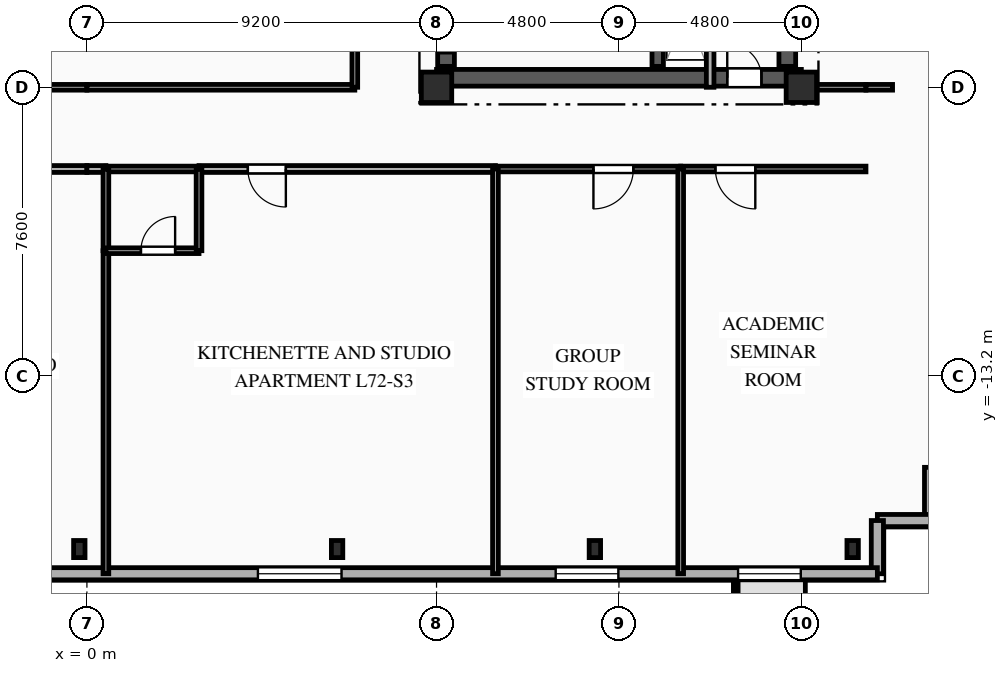
"""IFC4 building model, lengths in metres.
Left out: names, types, materials, properties, quantities, classifications, styles, units other than length and angle.
Written with IfcOpenShell. Run it as: python <this file> out.ifc"""

import sys

from ifc_helpers import new_model, si_unit, direction, frame, frame_2d, origin, origin_2d, place, context, subcontext, project, spatial, rectangle, i_section, extrude, element, fill, save


model = new_model("IFC4")
c1 = context("Model", 3, precision=1e-05, world=origin(), true_north=direction((0.0, 1.0)))
c2 = subcontext(c1, "Body", "Model", "MODEL_VIEW")
j1 = project(units=[si_unit("LENGTHUNIT", "METRE"), si_unit("PLANEANGLEUNIT", "RADIAN")], contexts=[c1])
p1 = place(None, origin())
s1 = spatial("IfcSite", under=j1, at=p1, CompositionType="ELEMENT")
p2 = place(p1, origin())
s2 = spatial("IfcBuilding", under=s1, at=p2, CompositionType="ELEMENT")
p3 = place(p2, frame((0.0, 0.0, 255.1)))
s3 = spatial("IfcBuildingStorey", under=s2, at=p3, CompositionType="ELEMENT", Elevation=255.1)
for number, where, z_axis, x_axis in (
    (1, (9.2, -5.6, 0.0), (0.0, 0.0, 1.0), (1.0, 0.0, 0.0)),
    (2, (18.8, -5.6, 0.0), (0.0, 0.0, 1.0), (1.0, 0.0, 0.0)),
):
    element("IfcColumn", number, at=place(p3, frame(where, z_axis=z_axis, x_axis=x_axis)), inside=s3, PredefinedType="COLUMN", context=c2, shape_type="SweptSolid", body=[
        extrude(rectangle(XDim=0.8, YDim=0.8, at=origin_2d()), origin(), (0.0, 0.0, 1.0), 3.35),
    ])
for number, where, z_axis, x_axis in (
    (3, (-0.2, -17.75, 0.0), (0.0, 0.0, 1.0), (1.0, 0.0, 0.0)),
    (4, (6.583, -17.75, 0.0), (0.0, 0.0, 1.0), (1.0, 0.0, 0.0)),
    (5, (13.367, -17.75, 0.0), (0.0, 0.0, 1.0), (1.0, 0.0, 0.0)),
    (6, (20.15, -17.75, 0.0), (0.0, 0.0, 1.0), (1.0, 0.0, 0.0)),
):
    element("IfcColumn", number, at=place(p3, frame(where, z_axis=z_axis, x_axis=x_axis)), inside=s3, PredefinedType="COLUMN", context=c2, shape_type="SweptSolid", body=[
        extrude(i_section(OverallWidth=0.3, OverallDepth=0.45, WebThickness=0.014, FlangeThickness=0.026, FilletRadius=0.027, at=origin_2d()), origin(), (0.0, 0.0, 1.0), 3.35),
    ])
for number, where, z_axis, x_axis in (
    (7, (22.2, -15.6, 0.0), (0.0, 0.0, 1.0), (0.0, -1.0, 0.0)),
    (8, (22.2, -17.0, 0.0), (0.0, 0.0, 1.0), (-1.0, 0.0, 0.0)),
    (9, (20.8, -17.0, 0.0), (0.0, 0.0, 1.0), (0.0, -1.0, 0.0)),
):
    element("IfcWall", number, at=place(p3, frame(where, z_axis=z_axis, x_axis=x_axis)), inside=s3, PredefinedType="SOLIDWALL", context=c2, shape_type="SweptSolid", body=[
        extrude(rectangle(XDim=1.4, YDim=0.32, at=frame_2d((0.7, 0.0))), origin(), (0.0, 0.0, 1.0), 3.04),
    ])
p4 = place(p3, frame((20.8, -18.4, 0.0), z_axis=(0.0, 0.0, 1.0), x_axis=(-1.0, 0.0, 0.0)))
e10 = element("IfcWall", 10, at=p4, inside=s3, PredefinedType="SOLIDWALL", context=c2, shape_type="SweptSolid", body=[
    extrude(rectangle(XDim=42.0, YDim=0.32, at=frame_2d((21.0, 0.0))), origin(), (0.0, 0.0, 1.0), 3.04),
])
p5 = place(p4, frame((2.015, 0.0, 0.85)))
e11 = element("IfcOpeningElement", 11, at=p5, cuts=e10, PredefinedType="OPENING", context=c2, shape_type="SweptSolid", body=[
    extrude(rectangle(XDim=1.65, YDim=1.85, at=frame_2d((0.825, 0.925))), frame((0.0, 0.17, 0.0), z_axis=(0.0, -1.0, 0.0), x_axis=(1.0, 0.0, 0.0)), (0.0, 0.0, 1.0), 0.34),
])
p6 = place(p4, frame((6.815, 0.0, 0.85)))
e12 = element("IfcOpeningElement", 12, at=p6, cuts=e10, PredefinedType="OPENING", context=c2, shape_type="SweptSolid", body=[
    extrude(rectangle(XDim=1.65, YDim=1.85, at=frame_2d((0.825, 0.925))), frame((0.0, 0.17, 0.0), z_axis=(0.0, -1.0, 0.0), x_axis=(1.0, 0.0, 0.0)), (0.0, 0.0, 1.0), 0.34),
])
p7 = place(p4, frame((14.1, 0.0, 0.85)))
e13 = element("IfcOpeningElement", 13, at=p7, cuts=e10, PredefinedType="OPENING", context=c2, shape_type="SweptSolid", body=[
    extrude(rectangle(XDim=2.2, YDim=1.85, at=frame_2d((1.1, 0.925))), frame((0.0, 0.17, 0.0), z_axis=(0.0, -1.0, 0.0), x_axis=(1.0, 0.0, 0.0)), (0.0, 0.0, 1.0), 0.34),
])
p8 = place(p4, frame((24.34, 0.0, 0.85)))
e14 = element("IfcOpeningElement", 14, at=p8, cuts=e10, PredefinedType="OPENING", context=c2, shape_type="SweptSolid", body=[
    extrude(rectangle(XDim=2.2, YDim=1.85, at=frame_2d((1.1, 0.925))), frame((0.0, 0.17, 0.0), z_axis=(0.0, -1.0, 0.0), x_axis=(1.0, 0.0, 0.0)), (0.0, 0.0, 1.0), 0.34),
])
p9 = place(p4, frame((32.455, 0.0, 0.85)))
e15 = element("IfcOpeningElement", 15, at=p9, cuts=e10, PredefinedType="OPENING", context=c2, shape_type="SweptSolid", body=[
    extrude(rectangle(XDim=1.65, YDim=1.85, at=frame_2d((0.825, 0.925))), frame((0.0, 0.17, 0.0), z_axis=(0.0, -1.0, 0.0), x_axis=(1.0, 0.0, 0.0)), (0.0, 0.0, 1.0), 0.34),
])
p10 = place(p4, frame((37.855, 0.0, 0.85)))
e16 = element("IfcOpeningElement", 16, at=p10, cuts=e10, PredefinedType="OPENING", context=c2, shape_type="SweptSolid", body=[
    extrude(rectangle(XDim=1.65, YDim=1.85, at=frame_2d((0.825, 0.925))), frame((0.0, 0.17, 0.0), z_axis=(0.0, -1.0, 0.0), x_axis=(1.0, 0.0, 0.0)), (0.0, 0.0, 1.0), 0.34),
])
p11 = place(p3, frame((9.2, -5.35, 0.0), z_axis=(0.0, 0.0, 1.0), x_axis=(1.0, 0.0, 0.0)))
e17 = element("IfcWall", 17, at=p11, inside=s3, PredefinedType="SHEAR", context=c2, shape_type="SweptSolid", body=[
    extrude(rectangle(XDim=9.6, YDim=0.44, at=frame_2d((4.8, 0.0))), origin(), (0.0, 0.0, 1.0), 3.04),
])
p12 = place(p11, frame((7.65, 0.0, 0.0)))
e18 = element("IfcOpeningElement", 18, at=p12, cuts=e17, PredefinedType="OPENING", context=c2, shape_type="SweptSolid", body=[
    extrude(rectangle(XDim=0.9, YDim=2.1, at=frame_2d((0.45, 1.05))), frame((0.0, 0.23, 0.0), z_axis=(0.0, -1.0, 0.0), x_axis=(1.0, 0.0, 0.0)), (0.0, 0.0, 1.0), 0.46),
])
p13 = place(p3, frame((9.45, -5.05, 0.0), z_axis=(0.0, 0.0, 1.0), x_axis=(0.0, 1.0, 0.0)))
e19 = element("IfcWall", 19, at=p13, inside=s3, PredefinedType="SHEAR", context=c2, shape_type="SweptSolid", body=[
    extrude(rectangle(XDim=10.1, YDim=0.44, at=frame_2d((5.05, 0.0))), origin(), (0.0, 0.0, 1.0), 3.04),
])
p14 = place(p13, frame((7.15, 0.0, 0.0)))
e20 = element("IfcOpeningElement", 20, at=p14, cuts=e19, PredefinedType="OPENING", context=c2, shape_type="SweptSolid", body=[
    extrude(rectangle(XDim=0.9, YDim=2.1, at=frame_2d((0.45, 1.05))), frame((0.0, 0.23, 0.0), z_axis=(0.0, -1.0, 0.0), x_axis=(1.0, 0.0, 0.0)), (0.0, 0.0, 1.0), 0.46),
])
p15 = place(p13, frame((2.4, 0.0, 0.0)))
e21 = element("IfcOpeningElement", 21, at=p15, cuts=e19, PredefinedType="OPENING", context=c2, shape_type="SweptSolid", body=[
    extrude(rectangle(XDim=1.2, YDim=2.15, at=frame_2d((0.6, 1.075))), frame((0.0, 0.23, 0.0), z_axis=(0.0, -1.0, 0.0), x_axis=(1.0, 0.0, 0.0)), (0.0, 0.0, 1.0), 0.46),
])
p16 = place(p13, frame((0.35, 0.0, 0.0)))
e22 = element("IfcOpeningElement", 22, at=p16, cuts=e19, PredefinedType="OPENING", context=c2, shape_type="SweptSolid", body=[
    extrude(rectangle(XDim=0.9, YDim=2.1, at=frame_2d((0.45, 1.05))), frame((0.0, 0.23, 0.0), z_axis=(0.0, -1.0, 0.0), x_axis=(1.0, 0.0, 0.0)), (0.0, 0.0, 1.0), 0.46),
])
p17 = place(p3, frame((18.43, -5.05, 0.0), z_axis=(0.0, 0.0, 1.0), x_axis=(0.0, 1.0, 0.0)))
e23 = element("IfcWall", 23, at=p17, inside=s3, PredefinedType="SHEAR", context=c2, shape_type="SweptSolid", body=[
    extrude(rectangle(XDim=10.1, YDim=0.44, at=frame_2d((5.05, 0.0))), origin(), (0.0, 0.0, 1.0), 3.04),
])
p18 = place(p3, frame((15.02, -5.05, 0.0), z_axis=(0.0, 0.0, 1.0), x_axis=(0.0, 1.0, 0.0)))
e24 = element("IfcWall", 24, at=p18, inside=s3, PredefinedType="SHEAR", context=c2, shape_type="SweptSolid", body=[
    extrude(rectangle(XDim=10.1, YDim=0.3, at=frame_2d((5.05, 0.0))), origin(), (0.0, 0.0, 1.0), 3.04),
])
p19 = place(p3, frame((16.4, -2.11, 0.0), z_axis=(0.0, 0.0, 1.0), x_axis=(0.0, -1.0, 0.0)))
e25 = element("IfcWall", 25, at=p19, inside=s3, PredefinedType="PARTITIONING", context=c2, shape_type="SweptSolid", body=[
    extrude(rectangle(XDim=3.49, YDim=0.2, at=frame_2d((1.745, 0.0))), origin(), (0.0, 0.0, 1.0), 3.04),
])
p20 = place(p3, frame((0.0, -7.75, 0.0), z_axis=(0.0, 0.0, 1.0), x_axis=(-1.0, 0.0, 0.0)))
e26 = element("IfcWall", 26, at=p20, inside=s3, PredefinedType="PARTITIONING", context=c2, shape_type="SweptSolid", body=[
    extrude(rectangle(XDim=7.3, YDim=0.18, at=frame_2d((3.65, 0.0))), origin(), (0.0, 0.0, 1.0), 3.04),
])
p21 = place(p20, frame((1.222, 0.0, 0.0)))
e27 = element("IfcOpeningElement", 27, at=p21, cuts=e26, PredefinedType="OPENING", context=c2, shape_type="SweptSolid", body=[
    extrude(rectangle(XDim=1.0, YDim=2.15, at=frame_2d((0.5, 1.075))), frame((0.0, 0.1, 0.0), z_axis=(0.0, -1.0, 0.0), x_axis=(1.0, 0.0, 0.0)), (0.0, 0.0, 1.0), 0.2),
])
p22 = place(p3, frame((-7.05, -5.6, 0.0), z_axis=(0.0, 0.0, 1.0), x_axis=(1.0, 0.0, 0.0)))
e28 = element("IfcWall", 28, at=p22, inside=s3, PredefinedType="PARTITIONING", context=c2, shape_type="SweptSolid", body=[
    extrude(rectangle(XDim=7.05, YDim=0.15, at=frame_2d((3.525, 0.0))), origin(), (0.0, 0.0, 1.0), 2.525),
])
p23 = place(p22, frame((4.815, 0.0, 0.0)))
e29 = element("IfcOpeningElement", 29, at=p23, cuts=e28, PredefinedType="OPENING", context=c2, shape_type="SweptSolid", body=[
    extrude(rectangle(XDim=1.05, YDim=2.15, at=frame_2d((0.525, 1.075))), frame((0.0, 0.085, 0.0), z_axis=(0.0, -1.0, 0.0), x_axis=(1.0, 0.0, 0.0)), (0.0, 0.0, 1.0), 0.17),
])
p24 = place(p3, frame((18.8, -5.6, 0.0), z_axis=(0.0, 0.0, 1.0), x_axis=(1.0, 0.0, 0.0)))
e30 = element("IfcWall", 30, at=p24, inside=s3, PredefinedType="PARTITIONING", context=c2, shape_type="SweptSolid", body=[
    extrude(rectangle(XDim=1.7, YDim=0.15, at=frame_2d((0.85, 0.0))), origin(), (0.0, 0.0, 1.0), 3.04),
])
p25 = place(p3, frame((20.5, -5.6, 0.0), z_axis=(0.0, 0.0, 1.0), x_axis=(1.0, 0.0, 0.0)))
e31 = element("IfcWall", 31, at=p25, inside=s3, PredefinedType="PARTITIONING", context=c2, shape_type="SweptSolid", body=[
    extrude(rectangle(XDim=0.7, YDim=0.15, at=frame_2d((0.35, 0.0))), origin(), (0.0, 0.0, 1.0), 3.04),
])
p26 = place(p3, frame((0.5, -7.75, 0.0), z_axis=(0.0, 0.0, 1.0), x_axis=(-1.0, 0.0, 0.0)))
e32 = element("IfcWall", 32, at=p26, inside=s3, PredefinedType="PARTITIONING", context=c2, shape_type="SweptSolid", body=[
    extrude(rectangle(XDim=0.5, YDim=0.18, at=frame_2d((0.25, 0.0))), origin(), (0.0, 0.0, 1.0), 3.04),
])
p27 = place(p3, frame((10.75, -7.75, 0.0), z_axis=(0.0, 0.0, 1.0), x_axis=(-1.0, 0.0, 0.0)))
e33 = element("IfcWall", 33, at=p27, inside=s3, PredefinedType="PARTITIONING", context=c2, shape_type="SweptSolid", body=[
    extrude(rectangle(XDim=7.8, YDim=0.18, at=frame_2d((3.9, 0.0))), origin(), (0.0, 0.0, 1.0), 3.04),
])
p28 = place(p27, frame((5.515, 0.0, 0.0)))
e34 = element("IfcOpeningElement", 34, at=p28, cuts=e33, PredefinedType="OPENING", context=c2, shape_type="SweptSolid", body=[
    extrude(rectangle(XDim=1.0, YDim=2.15, at=frame_2d((0.5, 1.075))), frame((0.0, 0.1, 0.0), z_axis=(0.0, -1.0, 0.0), x_axis=(1.0, 0.0, 0.0)), (0.0, 0.0, 1.0), 0.2),
])
p29 = place(p3, frame((2.95, -7.75, 0.0), z_axis=(0.0, 0.0, 1.0), x_axis=(-1.0, 0.0, 0.0)))
e35 = element("IfcWall", 35, at=p29, inside=s3, PredefinedType="PLUMBINGWALL", context=c2, shape_type="SweptSolid", body=[
    extrude(rectangle(XDim=2.45, YDim=0.15, at=frame_2d((1.225, 0.0))), origin(), (0.0, 0.0, 1.0), 3.04),
])
p30 = place(p3, frame((15.625, -7.75, 0.0), z_axis=(0.0, 0.0, 1.0), x_axis=(-1.0, 0.0, 0.0)))
e36 = element("IfcWall", 36, at=p30, inside=s3, PredefinedType="PARTITIONING", context=c2, shape_type="SweptSolid", body=[
    extrude(rectangle(XDim=4.875, YDim=0.15, at=frame_2d((2.438, 0.0))), origin(), (0.0, 0.0, 1.0), 3.04),
])
p31 = place(p30, frame((1.246, 0.0, 0.0)))
e37 = element("IfcOpeningElement", 37, at=p31, cuts=e36, PredefinedType="OPENING", context=c2, shape_type="SweptSolid", body=[
    extrude(rectangle(XDim=1.05, YDim=2.15, at=frame_2d((0.525, 1.075))), frame((0.0, 0.085, 0.0), z_axis=(0.0, -1.0, 0.0), x_axis=(1.0, 0.0, 0.0)), (0.0, 0.0, 1.0), 0.17),
])
p32 = place(p3, frame((20.5, -7.75, 0.0), z_axis=(0.0, 0.0, 1.0), x_axis=(-1.0, 0.0, 0.0)))
e38 = element("IfcWall", 38, at=p32, inside=s3, PredefinedType="PARTITIONING", context=c2, shape_type="SweptSolid", body=[
    extrude(rectangle(XDim=4.875, YDim=0.15, at=frame_2d((2.438, 0.0))), origin(), (0.0, 0.0, 1.0), 3.04),
])
p33 = place(p32, frame((2.912, 0.0, 0.0)))
e39 = element("IfcOpeningElement", 39, at=p33, cuts=e38, PredefinedType="OPENING", context=c2, shape_type="SweptSolid", body=[
    extrude(rectangle(XDim=1.05, YDim=2.15, at=frame_2d((0.525, 1.075))), frame((0.0, 0.085, 0.0), z_axis=(0.0, -1.0, 0.0), x_axis=(1.0, 0.0, 0.0)), (0.0, 0.0, 1.0), 0.17),
])
p34 = place(p3, frame((0.0, -5.6, 0.0), z_axis=(0.0, 0.0, 1.0), x_axis=(1.0, 0.0, 0.0)))
e40 = element("IfcWall", 40, at=p34, inside=s3, PredefinedType="PARTITIONING", context=c2, shape_type="SweptSolid", body=[
    extrude(rectangle(XDim=7.05, YDim=0.15, at=frame_2d((3.525, 0.0))), origin(), (0.0, 0.0, 1.0), 2.525),
])
p35 = place(p3, frame((7.05, -5.6, 0.0), z_axis=(0.0, 0.0, 1.0), x_axis=(0.0, 1.0, 0.0)))
e41 = element("IfcWall", 41, at=p35, inside=s3, PredefinedType="PARTITIONING", context=c2, shape_type="SweptSolid", body=[
    extrude(rectangle(XDim=7.05, YDim=0.15, at=frame_2d((3.525, 0.0))), origin(), (0.0, 0.0, 1.0), 3.04),
])
p36 = place(p3, frame((0.5, -9.9, 0.0), z_axis=(0.0, 0.0, 1.0), x_axis=(0.0, -1.0, 0.0)))
e42 = element("IfcWall", 42, at=p36, inside=s3, PredefinedType="PARTITIONING", context=c2, shape_type="SweptSolid", body=[
    extrude(rectangle(XDim=8.5, YDim=0.15, at=frame_2d((4.25, 0.0))), origin(), (0.0, 0.0, 1.0), 3.04),
])
p37 = place(p3, frame((0.5, -7.75, 0.0), z_axis=(0.0, 0.0, 1.0), x_axis=(0.0, -1.0, 0.0)))
e43 = element("IfcWall", 43, at=p37, inside=s3, PredefinedType="PLUMBINGWALL", context=c2, shape_type="SweptSolid", body=[
    extrude(rectangle(XDim=2.15, YDim=0.15, at=frame_2d((1.075, 0.0))), origin(), (0.0, 0.0, 1.0), 3.04),
])
p38 = place(p3, frame((0.5, -9.9, 0.0), z_axis=(0.0, 0.0, 1.0), x_axis=(1.0, 0.0, 0.0)))
e44 = element("IfcWall", 44, at=p38, inside=s3, PredefinedType="PLUMBINGWALL", context=c2, shape_type="SweptSolid", body=[
    extrude(rectangle(XDim=2.45, YDim=0.15, at=frame_2d((1.225, 0.0))), origin(), (0.0, 0.0, 1.0), 3.04),
])
p39 = place(p38, frame((0.921, 0.0, 0.0)))
e45 = element("IfcOpeningElement", 45, at=p39, cuts=e44, PredefinedType="OPENING", context=c2, shape_type="SweptSolid", body=[
    extrude(rectangle(XDim=0.9, YDim=2.1, at=frame_2d((0.45, 1.05))), frame((0.0, 0.085, 0.0), z_axis=(0.0, -1.0, 0.0), x_axis=(1.0, 0.0, 0.0)), (0.0, 0.0, 1.0), 0.17),
])
p40 = place(p3, frame((2.95, -9.9, 0.0), z_axis=(0.0, 0.0, 1.0), x_axis=(0.0, 1.0, 0.0)))
e46 = element("IfcWall", 46, at=p40, inside=s3, PredefinedType="PLUMBINGWALL", context=c2, shape_type="SweptSolid", body=[
    extrude(rectangle(XDim=2.15, YDim=0.15, at=frame_2d((1.075, 0.0))), origin(), (0.0, 0.0, 1.0), 3.04),
])
for number, where, z_axis, x_axis in (
    (47, (10.75, -7.75, 0.0), (0.0, 0.0, 1.0), (0.0, -1.0, 0.0)),
    (48, (15.625, -7.75, 0.0), (0.0, 0.0, 1.0), (0.0, -1.0, 0.0)),
):
    element("IfcWall", number, at=place(p3, frame(where, z_axis=z_axis, x_axis=x_axis)), inside=s3, PredefinedType="PARTITIONING", context=c2, shape_type="SweptSolid", body=[
        extrude(rectangle(XDim=10.65, YDim=0.15, at=frame_2d((5.325, 0.0))), origin(), (0.0, 0.0, 1.0), 3.04),
    ])
p41 = place(p5, origin())
e49 = element("IfcWindow", 49, at=p41, inside=s3, PartitioningType="SINGLE_PANEL", PredefinedType="WINDOW", context=c2, shape_type="SweptSolid", body=[
    extrude(rectangle(XDim=1.65, YDim=1.85, at=frame_2d((0.825, 0.925))), frame((0.0, 0.03, 0.0), z_axis=(0.0, -1.0, 0.0), x_axis=(1.0, 0.0, 0.0)), (0.0, 0.0, 1.0), 0.06),
])
fill(e11, e49)
p42 = place(p6, origin())
e50 = element("IfcWindow", 50, at=p42, inside=s3, PartitioningType="SINGLE_PANEL", PredefinedType="WINDOW", context=c2, shape_type="SweptSolid", body=[
    extrude(rectangle(XDim=1.65, YDim=1.85, at=frame_2d((0.825, 0.925))), frame((0.0, 0.03, 0.0), z_axis=(0.0, -1.0, 0.0), x_axis=(1.0, 0.0, 0.0)), (0.0, 0.0, 1.0), 0.06),
])
fill(e12, e50)
p43 = place(p7, origin())
e51 = element("IfcWindow", 51, at=p43, inside=s3, PartitioningType="SINGLE_PANEL", PredefinedType="WINDOW", context=c2, shape_type="SweptSolid", body=[
    extrude(rectangle(XDim=2.2, YDim=1.85, at=frame_2d((1.1, 0.925))), frame((0.0, 0.03, 0.0), z_axis=(0.0, -1.0, 0.0), x_axis=(1.0, 0.0, 0.0)), (0.0, 0.0, 1.0), 0.06),
])
fill(e13, e51)
p44 = place(p12, origin())
e52 = element("IfcDoor", 52, at=p44, inside=s3, OperationType="SINGLE_SWING_LEFT", PredefinedType="DOOR", context=c2, shape_type="SweptSolid", body=[
    extrude(rectangle(XDim=0.9, YDim=2.1, at=frame_2d((0.45, 1.05))), frame((0.0, 0.025, 0.0), z_axis=(0.0, -1.0, 0.0), x_axis=(1.0, 0.0, 0.0)), (0.0, 0.0, 1.0), 0.05),
])
fill(e18, e52)
p45 = place(p16, origin())
e53 = element("IfcDoor", 53, at=p45, inside=s3, OperationType="SINGLE_SWING_RIGHT", PredefinedType="DOOR", context=c2, shape_type="SweptSolid", body=[
    extrude(rectangle(XDim=0.9, YDim=2.1, at=frame_2d((0.45, 1.05))), frame((0.0, 0.025, 0.0), z_axis=(0.0, -1.0, 0.0), x_axis=(1.0, 0.0, 0.0)), (0.0, 0.0, 1.0), 0.05),
])
fill(e22, e53)
p46 = place(p28, origin())
e54 = element("IfcDoor", 54, at=p46, inside=s3, OperationType="SINGLE_SWING_LEFT", PredefinedType="DOOR", context=c2, shape_type="SweptSolid", body=[
    extrude(rectangle(XDim=1.0, YDim=2.15, at=frame_2d((0.5, 1.075))), frame((0.0, 0.025, 0.0), z_axis=(0.0, -1.0, 0.0), x_axis=(1.0, 0.0, 0.0)), (0.0, 0.0, 1.0), 0.05),
])
fill(e34, e54)
p47 = place(p31, origin())
e55 = element("IfcDoor", 55, at=p47, inside=s3, OperationType="SINGLE_SWING_RIGHT", PredefinedType="DOOR", context=c2, shape_type="SweptSolid", body=[
    extrude(rectangle(XDim=1.05, YDim=2.15, at=frame_2d((0.525, 1.075))), frame((0.0, 0.025, 0.0), z_axis=(0.0, -1.0, 0.0), x_axis=(1.0, 0.0, 0.0)), (0.0, 0.0, 1.0), 0.05),
])
fill(e37, e55)
p48 = place(p33, origin())
e56 = element("IfcDoor", 56, at=p48, inside=s3, OperationType="SINGLE_SWING_LEFT", PredefinedType="DOOR", context=c2, shape_type="SweptSolid", body=[
    extrude(rectangle(XDim=1.05, YDim=2.15, at=frame_2d((0.525, 1.075))), frame((0.0, 0.025, 0.0), z_axis=(0.0, -1.0, 0.0), x_axis=(1.0, 0.0, 0.0)), (0.0, 0.0, 1.0), 0.05),
])
fill(e39, e56)
p49 = place(p39, origin())
e57 = element("IfcDoor", 57, at=p49, inside=s3, OperationType="SINGLE_SWING_RIGHT", PredefinedType="DOOR", context=c2, shape_type="SweptSolid", body=[
    extrude(rectangle(XDim=0.9, YDim=2.1, at=frame_2d((0.45, 1.05))), frame((0.0, 0.025, 0.0), z_axis=(0.0, -1.0, 0.0), x_axis=(1.0, 0.0, 0.0)), (0.0, 0.0, 1.0), 0.05),
])
fill(e45, e57)
save(model, sys.argv[1])
